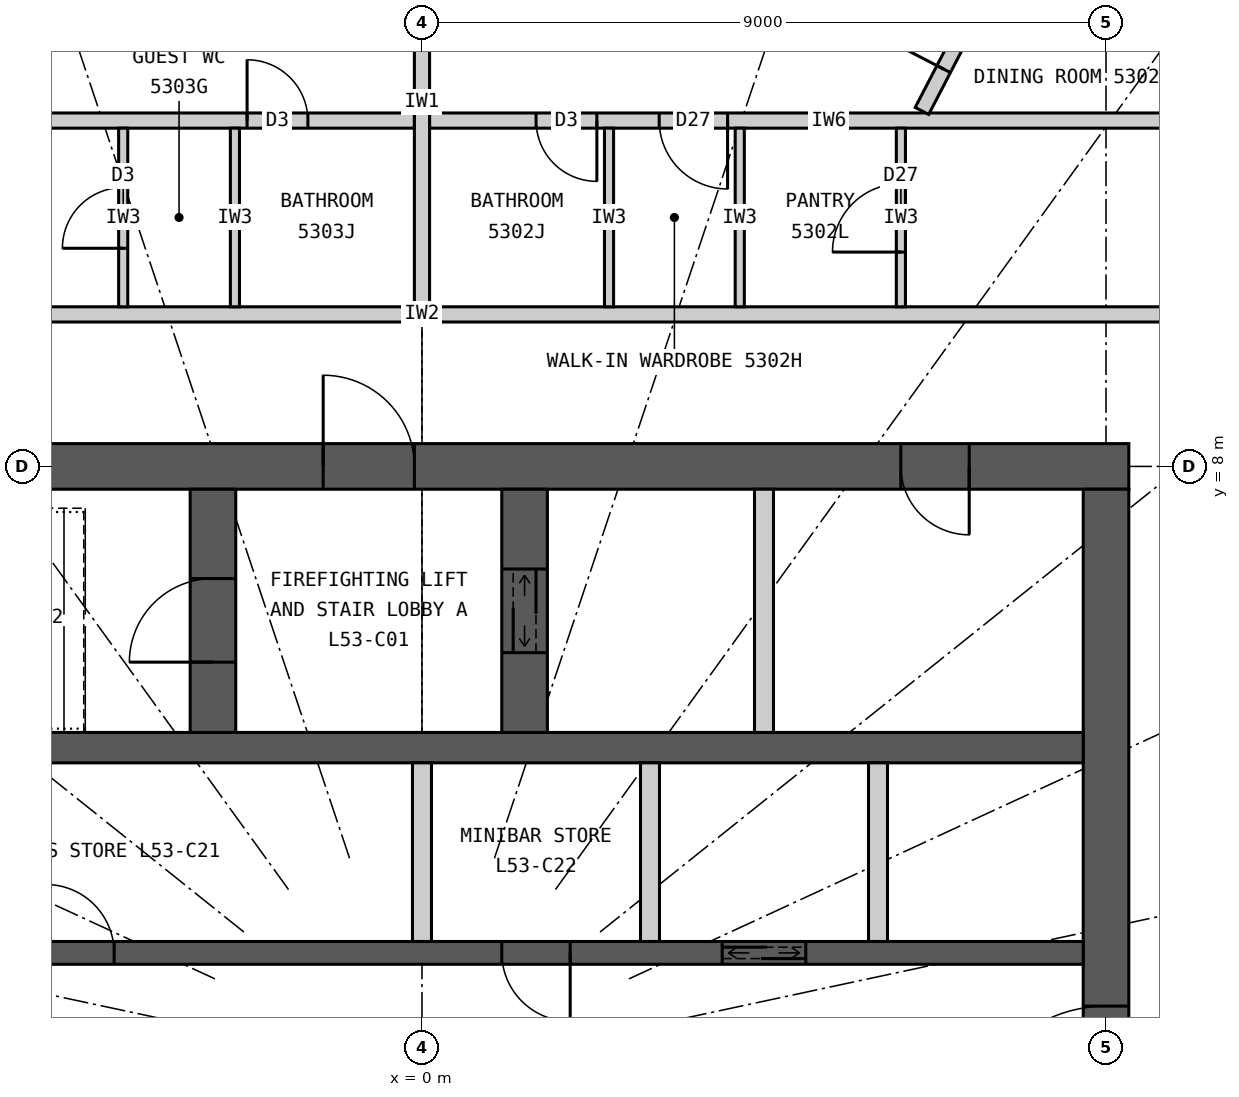
"""IFC4 building model, lengths in metres.
Left out: names, types, materials, properties, quantities, classifications, styles, units other than length and angle.
Written with IfcOpenShell. Run it as: python <this file> out.ifc"""

import sys

from ifc_helpers import new_model, si_unit, direction, frame, frame_2d, origin, origin_2d, place, context, subcontext, project, spatial, rectangle, circle, extrude, element, fill, save


model = new_model("IFC4")
c1 = context("Model", 3, precision=1e-05, world=origin(), true_north=direction((0.0, 1.0)))
c2 = subcontext(c1, "Body", "Model", "MODEL_VIEW")
j1 = project(units=[si_unit("LENGTHUNIT", "METRE"), si_unit("PLANEANGLEUNIT", "RADIAN")], contexts=[c1])
p1 = place(None, origin())
s1 = spatial("IfcSite", under=j1, at=p1, CompositionType="ELEMENT")
p2 = place(p1, origin())
s2 = spatial("IfcBuilding", under=s1, at=p2, CompositionType="ELEMENT")
p3 = place(p2, frame((0.0, 0.0, 199.5)))
s3 = spatial("IfcBuildingStorey", under=s2, at=p3, CompositionType="ELEMENT", Elevation=199.5)
p4 = place(p3, frame((10.019, 13.883, 0.0), z_axis=(0.0, 0.0, 1.0), x_axis=(1.0, 0.0, 0.0)))
e1 = element("IfcColumn", 1, at=p4, inside=s3, PredefinedType="COLUMN", context=c2, shape_type="SweptSolid", body=[
    extrude(circle(Radius=0.45, at=origin_2d()), origin(), (0.0, 0.0, 1.0), 3.3),
])
p5 = place(p3, frame((-9.3, 8.0, 0.0), z_axis=(0.0, 0.0, 1.0), x_axis=(1.0, 0.0, 0.0)))
e2 = element("IfcWall", 2, at=p5, inside=s3, PredefinedType="SHEAR", context=c2, shape_type="SweptSolid", body=[
    extrude(rectangle(XDim=18.6, YDim=0.6, at=frame_2d((9.3, 0.0))), origin(), (0.0, 0.0, 1.0), 3.3),
])
p6 = place(p5, frame((8.0, 0.0, 0.0)))
e3 = element("IfcOpeningElement", 3, at=p6, cuts=e2, PredefinedType="OPENING", context=c2, shape_type="SweptSolid", body=[
    extrude(rectangle(XDim=1.2, YDim=2.2, at=frame_2d((0.6, 1.1))), frame((0.0, 0.31, 0.0), z_axis=(0.0, -1.0, 0.0), x_axis=(1.0, 0.0, 0.0)), (0.0, 0.0, 1.0), 0.62),
])
p7 = place(p5, frame((15.6, 0.0, 0.0)))
e4 = element("IfcOpeningElement", 4, at=p7, cuts=e2, PredefinedType="OPENING", context=c2, shape_type="SweptSolid", body=[
    extrude(rectangle(XDim=0.9, YDim=2.2, at=frame_2d((0.45, 1.1))), frame((0.0, 0.31, 0.0), z_axis=(0.0, -1.0, 0.0), x_axis=(1.0, 0.0, 0.0)), (0.0, 0.0, 1.0), 0.62),
])
p8 = place(p3, frame((9.0, -7.7, 0.0), z_axis=(0.0, 0.0, 1.0), x_axis=(0.0, 1.0, 0.0)))
e5 = element("IfcWall", 5, at=p8, inside=s3, PredefinedType="SHEAR", context=c2, shape_type="SweptSolid", body=[
    extrude(rectangle(XDim=15.4, YDim=0.6, at=frame_2d((7.7, 0.0))), origin(), (0.0, 0.0, 1.0), 3.3),
])
p9 = place(p8, frame((6.8, 0.0, 0.0)))
e6 = element("IfcOpeningElement", 6, at=p9, cuts=e5, PredefinedType="OPENING", context=c2, shape_type="SweptSolid", body=[
    extrude(rectangle(XDim=1.8, YDim=2.2, at=frame_2d((0.9, 1.1))), frame((0.0, 0.31, 0.0), z_axis=(0.0, -1.0, 0.0), x_axis=(1.0, 0.0, 0.0)), (0.0, 0.0, 1.0), 0.62),
])
p10 = place(p3, frame((-8.7, 4.3, 0.0), z_axis=(0.0, 0.0, 1.0), x_axis=(1.0, 0.0, 0.0)))
e7 = element("IfcWall", 7, at=p10, inside=s3, PredefinedType="SHEAR", context=c2, shape_type="SweptSolid", body=[
    extrude(rectangle(XDim=17.4, YDim=0.4, at=frame_2d((8.7, 0.0))), origin(), (0.0, 0.0, 1.0), 3.3),
])
p11 = place(p3, frame((-8.7, 1.6, 0.0), z_axis=(0.0, 0.0, 1.0), x_axis=(1.0, 0.0, 0.0)))
e8 = element("IfcWall", 8, at=p11, inside=s3, PredefinedType="SHEAR", context=c2, shape_type="SweptSolid", body=[
    extrude(rectangle(XDim=17.4, YDim=0.3, at=frame_2d((8.7, 0.0))), origin(), (0.0, 0.0, 1.0), 3.3),
])
p12 = place(p11, frame((12.65, 0.0, 0.0)))
e9 = element("IfcOpeningElement", 9, at=p12, cuts=e8, PredefinedType="OPENING", context=c2, shape_type="SweptSolid", body=[
    extrude(rectangle(XDim=1.1, YDim=2.2, at=frame_2d((0.55, 1.1))), frame((0.0, 0.16, 0.0), z_axis=(0.0, -1.0, 0.0), x_axis=(1.0, 0.0, 0.0)), (0.0, 0.0, 1.0), 0.32),
])
p13 = place(p11, frame((3.75, 0.0, 0.0)))
e10 = element("IfcOpeningElement", 10, at=p13, cuts=e8, PredefinedType="OPENING", context=c2, shape_type="SweptSolid", body=[
    extrude(rectangle(XDim=0.9, YDim=2.2, at=frame_2d((0.45, 1.1))), frame((0.0, 0.16, 0.0), z_axis=(0.0, -1.0, 0.0), x_axis=(1.0, 0.0, 0.0)), (0.0, 0.0, 1.0), 0.32),
])
p14 = place(p11, frame((9.75, 0.0, 0.0)))
e11 = element("IfcOpeningElement", 11, at=p14, cuts=e8, PredefinedType="OPENING", context=c2, shape_type="SweptSolid", body=[
    extrude(rectangle(XDim=0.9, YDim=2.2, at=frame_2d((0.45, 1.1))), frame((0.0, 0.16, 0.0), z_axis=(0.0, -1.0, 0.0), x_axis=(1.0, 0.0, 0.0)), (0.0, 0.0, 1.0), 0.32),
])
p15 = place(p3, frame((-2.75, 4.5, 0.0), z_axis=(0.0, 0.0, 1.0), x_axis=(0.0, 1.0, 0.0)))
e12 = element("IfcWall", 12, at=p15, inside=s3, PredefinedType="SHEAR", context=c2, shape_type="SweptSolid", body=[
    extrude(rectangle(XDim=3.2, YDim=0.6, at=frame_2d((1.6, 0.0))), origin(), (0.0, 0.0, 1.0), 3.3),
])
p16 = place(p15, frame((0.925, 0.0, 0.0)))
e13 = element("IfcOpeningElement", 13, at=p16, cuts=e12, PredefinedType="OPENING", context=c2, shape_type="SweptSolid", body=[
    extrude(rectangle(XDim=1.1, YDim=2.2, at=frame_2d((0.55, 1.1))), frame((0.0, 0.31, 0.0), z_axis=(0.0, -1.0, 0.0), x_axis=(1.0, 0.0, 0.0)), (0.0, 0.0, 1.0), 0.62),
])
p17 = place(p3, frame((1.35, 4.5, 0.0), z_axis=(0.0, 0.0, 1.0), x_axis=(0.0, 1.0, 0.0)))
e14 = element("IfcWall", 14, at=p17, inside=s3, PredefinedType="SHEAR", context=c2, shape_type="SweptSolid", body=[
    extrude(rectangle(XDim=3.2, YDim=0.6, at=frame_2d((1.6, 0.0))), origin(), (0.0, 0.0, 1.0), 3.3),
])
p18 = place(p17, frame((1.05, 0.0, 0.0)))
e15 = element("IfcOpeningElement", 15, at=p18, cuts=e14, PredefinedType="OPENING", context=c2, shape_type="SweptSolid", body=[
    extrude(rectangle(XDim=1.1, YDim=2.2, at=frame_2d((0.55, 1.1))), frame((0.0, 0.31, 0.0), z_axis=(0.0, -1.0, 0.0), x_axis=(1.0, 0.0, 0.0)), (0.0, 0.0, 1.0), 0.62),
])
p19 = place(p3, frame((4.5, 4.5, 0.0), z_axis=(0.0, 0.0, 1.0), x_axis=(0.0, 1.0, 0.0)))
e16 = element("IfcWall", 16, at=p19, inside=s3, PredefinedType="PARTITIONING", context=c2, shape_type="SweptSolid", body=[
    extrude(rectangle(XDim=3.2, YDim=0.25, at=frame_2d((1.6, 0.0))), origin(), (0.0, 0.0, 1.0), 3.3),
])
for number, where, z_axis, x_axis in (
    (17, (0.0, 1.75, 0.0), (0.0, 0.0, 1.0), (0.0, 1.0, 0.0)),
    (18, (3.0, 1.75, 0.0), (0.0, 0.0, 1.0), (0.0, 1.0, 0.0)),
    (19, (6.0, 1.75, 0.0), (0.0, 0.0, 1.0), (0.0, 1.0, 0.0)),
):
    element("IfcWall", number, at=place(p3, frame(where, z_axis=z_axis, x_axis=x_axis)), inside=s3, PredefinedType="PARTITIONING", context=c2, shape_type="SweptSolid", body=[
        extrude(rectangle(XDim=2.35, YDim=0.25, at=frame_2d((1.175, 0.0))), origin(), (0.0, 0.0, 1.0), 3.3),
    ])
p20 = place(p3, frame((-11.1, 10.0, 0.0), z_axis=(0.0, 0.0, 1.0), x_axis=(1.0, 0.0, 0.0)))
e20 = element("IfcWall", 20, at=p20, inside=s3, PredefinedType="PARTITIONING", context=c2, shape_type="SweptSolid", body=[
    extrude(rectangle(XDim=22.2, YDim=0.2, at=frame_2d((11.1, 0.0))), origin(), (0.0, 0.0, 1.0), 3.12),
])
p21 = place(p20, frame((2.309, 0.0, 0.0)))
e21 = element("IfcOpeningElement", 21, at=p21, cuts=e20, PredefinedType="OPENING", context=c2, shape_type="SweptSolid", body=[
    extrude(rectangle(XDim=1.0, YDim=2.2, at=frame_2d((0.5, 1.1))), frame((0.0, 0.11, 0.0), z_axis=(0.0, -1.0, 0.0), x_axis=(1.0, 0.0, 0.0)), (0.0, 0.0, 1.0), 0.22),
])
p22 = place(p3, frame((0.0, 10.1, 0.0), z_axis=(0.0, 0.0, 1.0), x_axis=(0.0, 1.0, 0.0)))
e22 = element("IfcWall", 22, at=p22, inside=s3, PredefinedType="PARTITIONING", context=c2, shape_type="SweptSolid", body=[
    extrude(rectangle(XDim=5.4, YDim=0.2, at=frame_2d((2.7, 0.0))), origin(), (0.0, 0.0, 1.0), 2.42),
])
p23 = place(p3, frame((10.609, 12.55, 0.0), z_axis=(0.0, 0.0, 1.0), x_axis=(-1.0, 0.0, 0.0)))
e23 = element("IfcWall", 23, at=p23, inside=s3, PredefinedType="PARTITIONING", context=c2, shape_type="SweptSolid", body=[
    extrude(rectangle(XDim=10.508, YDim=0.2, at=frame_2d((5.254, 0.0))), origin(), (0.0, 0.0, 1.0), 3.12),
])
p24 = place(p23, frame((6.588, 0.0, 0.0)))
e24 = element("IfcOpeningElement", 24, at=p24, cuts=e23, PredefinedType="OPENING", context=c2, shape_type="SweptSolid", body=[
    extrude(rectangle(XDim=0.9, YDim=2.1, at=frame_2d((0.45, 1.05))), frame((0.0, 0.11, 0.0), z_axis=(0.0, -1.0, 0.0), x_axis=(1.0, 0.0, 0.0)), (0.0, 0.0, 1.0), 0.22),
])
p25 = place(p23, frame((8.308, 0.0, 0.0)))
e25 = element("IfcOpeningElement", 25, at=p25, cuts=e23, PredefinedType="OPENING", context=c2, shape_type="SweptSolid", body=[
    extrude(rectangle(XDim=0.8, YDim=2.1, at=frame_2d((0.4, 1.05))), frame((0.0, 0.11, 0.0), z_axis=(0.0, -1.0, 0.0), x_axis=(1.0, 0.0, 0.0)), (0.0, 0.0, 1.0), 0.22),
])
p26 = place(p3, frame((6.578, 12.677, 0.0), z_axis=(0.0, 0.0, 1.0), x_axis=(0.460620531465, 0.887597164255, 0.0)))
e26 = element("IfcWall", 26, at=p26, inside=s3, PredefinedType="PARTITIONING", context=c2, shape_type="SweptSolid", body=[
    extrude(rectangle(XDim=2.678, YDim=0.2, at=frame_2d((1.339, 0.0))), origin(), (0.0, 0.0, 1.0), 3.12),
])
p27 = place(p26, frame((0.62, 0.0, 0.0)))
e27 = element("IfcOpeningElement", 27, at=p27, cuts=e26, PredefinedType="OPENING", context=c2, shape_type="SweptSolid", body=[
    extrude(rectangle(XDim=0.9, YDim=2.1, at=frame_2d((0.45, 1.05))), frame((0.0, 0.11, 0.0), z_axis=(0.0, -1.0, 0.0), x_axis=(1.0, 0.0, 0.0)), (0.0, 0.0, 1.0), 0.22),
])
p28 = place(p3, frame((6.301, 10.1, 0.0), z_axis=(0.0, 0.0, 1.0), x_axis=(0.0, 1.0, 0.0)))
e28 = element("IfcWall", 28, at=p28, inside=s3, PredefinedType="PARTITIONING", context=c2, shape_type="SweptSolid", body=[
    extrude(rectangle(XDim=2.35, YDim=0.12, at=frame_2d((1.175, 0.0))), origin(), (0.0, 0.0, 1.0), 3.12),
])
p29 = place(p28, frame((0.72, 0.0, 0.0)))
e29 = element("IfcOpeningElement", 29, at=p29, cuts=e28, PredefinedType="OPENING", context=c2, shape_type="SweptSolid", body=[
    extrude(rectangle(XDim=0.9, YDim=2.1, at=frame_2d((0.45, 1.05))), frame((0.0, 0.07, 0.0), z_axis=(0.0, -1.0, 0.0), x_axis=(1.0, 0.0, 0.0)), (0.0, 0.0, 1.0), 0.14),
])
for number, where, z_axis, x_axis in (
    (30, (4.181, 10.1, 0.0), (0.0, 0.0, 1.0), (0.0, 1.0, 0.0)),
    (31, (2.461, 10.1, 0.0), (0.0, 0.0, 1.0), (0.0, 1.0, 0.0)),
):
    element("IfcWall", number, at=place(p3, frame(where, z_axis=z_axis, x_axis=x_axis)), inside=s3, PredefinedType="PARTITIONING", context=c2, shape_type="SweptSolid", body=[
        extrude(rectangle(XDim=2.35, YDim=0.12, at=frame_2d((1.175, 0.0))), origin(), (0.0, 0.0, 1.0), 3.12),
    ])
p30 = place(p3, frame((-0.101, 12.55, 0.0), z_axis=(0.0, 0.0, 1.0), x_axis=(-1.0, 0.0, 0.0)))
e32 = element("IfcWall", 32, at=p30, inside=s3, PredefinedType="PARTITIONING", context=c2, shape_type="SweptSolid", body=[
    extrude(rectangle(XDim=10.508, YDim=0.2, at=frame_2d((5.254, 0.0))), origin(), (0.0, 0.0, 1.0), 3.12),
])
p31 = place(p30, frame((1.4, 0.0, 0.0)))
e33 = element("IfcOpeningElement", 33, at=p31, cuts=e32, PredefinedType="OPENING", context=c2, shape_type="SweptSolid", body=[
    extrude(rectangle(XDim=0.8, YDim=2.1, at=frame_2d((0.4, 1.05))), frame((0.0, 0.11, 0.0), z_axis=(0.0, -1.0, 0.0), x_axis=(1.0, 0.0, 0.0)), (0.0, 0.0, 1.0), 0.22),
])
p32 = place(p30, frame((7.07, 0.0, 0.0)))
e34 = element("IfcOpeningElement", 34, at=p32, cuts=e32, PredefinedType="OPENING", context=c2, shape_type="SweptSolid", body=[
    extrude(rectangle(XDim=0.9, YDim=2.1, at=frame_2d((0.45, 1.05))), frame((0.0, 0.11, 0.0), z_axis=(0.0, -1.0, 0.0), x_axis=(1.0, 0.0, 0.0)), (0.0, 0.0, 1.0), 0.22),
])
p33 = place(p3, frame((-2.461, 10.1, 0.0), z_axis=(0.0, 0.0, 1.0), x_axis=(0.0, 1.0, 0.0)))
e35 = element("IfcWall", 35, at=p33, inside=s3, PredefinedType="PARTITIONING", context=c2, shape_type="SweptSolid", body=[
    extrude(rectangle(XDim=2.35, YDim=0.12, at=frame_2d((1.175, 0.0))), origin(), (0.0, 0.0, 1.0), 3.12),
])
p34 = place(p3, frame((-3.931, 10.1, 0.0), z_axis=(0.0, 0.0, 1.0), x_axis=(0.0, 1.0, 0.0)))
e36 = element("IfcWall", 36, at=p34, inside=s3, PredefinedType="PARTITIONING", context=c2, shape_type="SweptSolid", body=[
    extrude(rectangle(XDim=2.35, YDim=0.12, at=frame_2d((1.175, 0.0))), origin(), (0.0, 0.0, 1.0), 3.12),
])
p35 = place(p34, frame((0.77, 0.0, 0.0)))
e37 = element("IfcOpeningElement", 37, at=p35, cuts=e36, PredefinedType="OPENING", context=c2, shape_type="SweptSolid", body=[
    extrude(rectangle(XDim=0.8, YDim=2.1, at=frame_2d((0.4, 1.05))), frame((0.0, 0.07, 0.0), z_axis=(0.0, -1.0, 0.0), x_axis=(1.0, 0.0, 0.0)), (0.0, 0.0, 1.0), 0.14),
])
p36 = place(p29, origin())
e38 = element("IfcDoor", 38, at=p36, inside=s3, OperationType="SINGLE_SWING_LEFT", PredefinedType="DOOR", context=c2, shape_type="SweptSolid", body=[
    extrude(rectangle(XDim=0.9, YDim=2.1, at=frame_2d((0.45, 1.05))), frame((0.0, 0.025, 0.0), z_axis=(0.0, -1.0, 0.0), x_axis=(1.0, 0.0, 0.0)), (0.0, 0.0, 1.0), 0.05),
])
fill(e29, e38)
p37 = place(p24, origin())
e39 = element("IfcDoor", 39, at=p37, inside=s3, OperationType="SINGLE_SWING_LEFT", PredefinedType="DOOR", context=c2, shape_type="SweptSolid", body=[
    extrude(rectangle(XDim=0.9, YDim=2.1, at=frame_2d((0.45, 1.05))), frame((0.0, 0.025, 0.0), z_axis=(0.0, -1.0, 0.0), x_axis=(1.0, 0.0, 0.0)), (0.0, 0.0, 1.0), 0.05),
])
fill(e24, e39)
p38 = place(p25, origin())
e40 = element("IfcDoor", 40, at=p38, inside=s3, OperationType="SINGLE_SWING_LEFT", PredefinedType="DOOR", context=c2, shape_type="SweptSolid", body=[
    extrude(rectangle(XDim=0.8, YDim=2.1, at=frame_2d((0.4, 1.05))), frame((0.0, 0.025, 0.0), z_axis=(0.0, -1.0, 0.0), x_axis=(1.0, 0.0, 0.0)), (0.0, 0.0, 1.0), 0.05),
])
fill(e25, e40)
p39 = place(p27, origin())
e41 = element("IfcDoor", 41, at=p39, inside=s3, OperationType="SINGLE_SWING_LEFT", PredefinedType="DOOR", context=c2, shape_type="SweptSolid", body=[
    extrude(rectangle(XDim=0.9, YDim=2.1, at=frame_2d((0.45, 1.05))), frame((0.0, 0.025, 0.0), z_axis=(0.0, -1.0, 0.0), x_axis=(1.0, 0.0, 0.0)), (0.0, 0.0, 1.0), 0.05),
])
fill(e27, e41)
p40 = place(p31, origin())
e42 = element("IfcDoor", 42, at=p40, inside=s3, OperationType="SINGLE_SWING_RIGHT", PredefinedType="DOOR", context=c2, shape_type="SweptSolid", body=[
    extrude(rectangle(XDim=0.8, YDim=2.1, at=frame_2d((0.4, 1.05))), frame((0.0, 0.025, 0.0), z_axis=(0.0, -1.0, 0.0), x_axis=(1.0, 0.0, 0.0)), (0.0, 0.0, 1.0), 0.05),
])
fill(e33, e42)
p41 = place(p35, origin())
e43 = element("IfcDoor", 43, at=p41, inside=s3, OperationType="SINGLE_SWING_LEFT", PredefinedType="DOOR", context=c2, shape_type="SweptSolid", body=[
    extrude(rectangle(XDim=0.8, YDim=2.1, at=frame_2d((0.4, 1.05))), frame((0.0, 0.025, 0.0), z_axis=(0.0, -1.0, 0.0), x_axis=(1.0, 0.0, 0.0)), (0.0, 0.0, 1.0), 0.05),
])
fill(e37, e43)
p42 = place(p6, origin())
e44 = element("IfcDoor", 44, at=p42, inside=s3, OperationType="SINGLE_SWING_LEFT", PredefinedType="DOOR", context=c2, shape_type="SweptSolid", body=[
    extrude(rectangle(XDim=1.2, YDim=2.2, at=frame_2d((0.6, 1.1))), frame((0.0, 0.025, 0.0), z_axis=(0.0, -1.0, 0.0), x_axis=(1.0, 0.0, 0.0)), (0.0, 0.0, 1.0), 0.05),
])
fill(e3, e44)
p43 = place(p16, origin())
e45 = element("IfcDoor", 45, at=p43, inside=s3, OperationType="SINGLE_SWING_LEFT", PredefinedType="DOOR", context=c2, shape_type="SweptSolid", body=[
    extrude(rectangle(XDim=1.1, YDim=2.2, at=frame_2d((0.55, 1.1))), frame((0.0, 0.025, 0.0), z_axis=(0.0, -1.0, 0.0), x_axis=(1.0, 0.0, 0.0)), (0.0, 0.0, 1.0), 0.05),
])
fill(e13, e45)
p44 = place(p18, origin())
e46 = element("IfcDoor", 46, at=p44, inside=s3, OperationType="DOUBLE_DOOR_SLIDING", PredefinedType="DOOR", context=c2, shape_type="SweptSolid", body=[
    extrude(rectangle(XDim=1.1, YDim=2.2, at=frame_2d((0.55, 1.1))), frame((0.0, 0.025, 0.0), z_axis=(0.0, -1.0, 0.0), x_axis=(1.0, 0.0, 0.0)), (0.0, 0.0, 1.0), 0.05),
])
fill(e15, e46)
p45 = place(p7, origin())
e47 = element("IfcDoor", 47, at=p45, inside=s3, OperationType="SINGLE_SWING_RIGHT", PredefinedType="DOOR", context=c2, shape_type="SweptSolid", body=[
    extrude(rectangle(XDim=0.9, YDim=2.2, at=frame_2d((0.45, 1.1))), frame((0.0, 0.025, 0.0), z_axis=(0.0, -1.0, 0.0), x_axis=(1.0, 0.0, 0.0)), (0.0, 0.0, 1.0), 0.05),
])
fill(e4, e47)
p46 = place(p12, origin())
e48 = element("IfcDoor", 48, at=p46, inside=s3, OperationType="DOUBLE_DOOR_SLIDING", PredefinedType="DOOR", context=c2, shape_type="SweptSolid", body=[
    extrude(rectangle(XDim=1.1, YDim=2.2, at=frame_2d((0.55, 1.1))), frame((0.0, 0.025, 0.0), z_axis=(0.0, -1.0, 0.0), x_axis=(1.0, 0.0, 0.0)), (0.0, 0.0, 1.0), 0.05),
])
fill(e9, e48)
p47 = place(p13, origin())
e49 = element("IfcDoor", 49, at=p47, inside=s3, OperationType="SINGLE_SWING_LEFT", PredefinedType="DOOR", context=c2, shape_type="SweptSolid", body=[
    extrude(rectangle(XDim=0.9, YDim=2.2, at=frame_2d((0.45, 1.1))), frame((0.0, 0.025, 0.0), z_axis=(0.0, -1.0, 0.0), x_axis=(1.0, 0.0, 0.0)), (0.0, 0.0, 1.0), 0.05),
])
fill(e10, e49)
p48 = place(p14, origin())
e50 = element("IfcDoor", 50, at=p48, inside=s3, OperationType="SINGLE_SWING_RIGHT", PredefinedType="DOOR", context=c2, shape_type="SweptSolid", body=[
    extrude(rectangle(XDim=0.9, YDim=2.2, at=frame_2d((0.45, 1.1))), frame((0.0, 0.025, 0.0), z_axis=(0.0, -1.0, 0.0), x_axis=(1.0, 0.0, 0.0)), (0.0, 0.0, 1.0), 0.05),
])
fill(e11, e50)
p49 = place(p9, origin())
e51 = element("IfcDoor", 51, at=p49, inside=s3, OperationType="DOUBLE_DOOR_DOUBLE_SWING", PredefinedType="DOOR", context=c2, shape_type="SweptSolid", body=[
    extrude(rectangle(XDim=1.8, YDim=2.2, at=frame_2d((0.9, 1.1))), frame((0.0, 0.025, 0.0), z_axis=(0.0, -1.0, 0.0), x_axis=(1.0, 0.0, 0.0)), (0.0, 0.0, 1.0), 0.05),
])
fill(e6, e51)
save(model, sys.argv[1])
